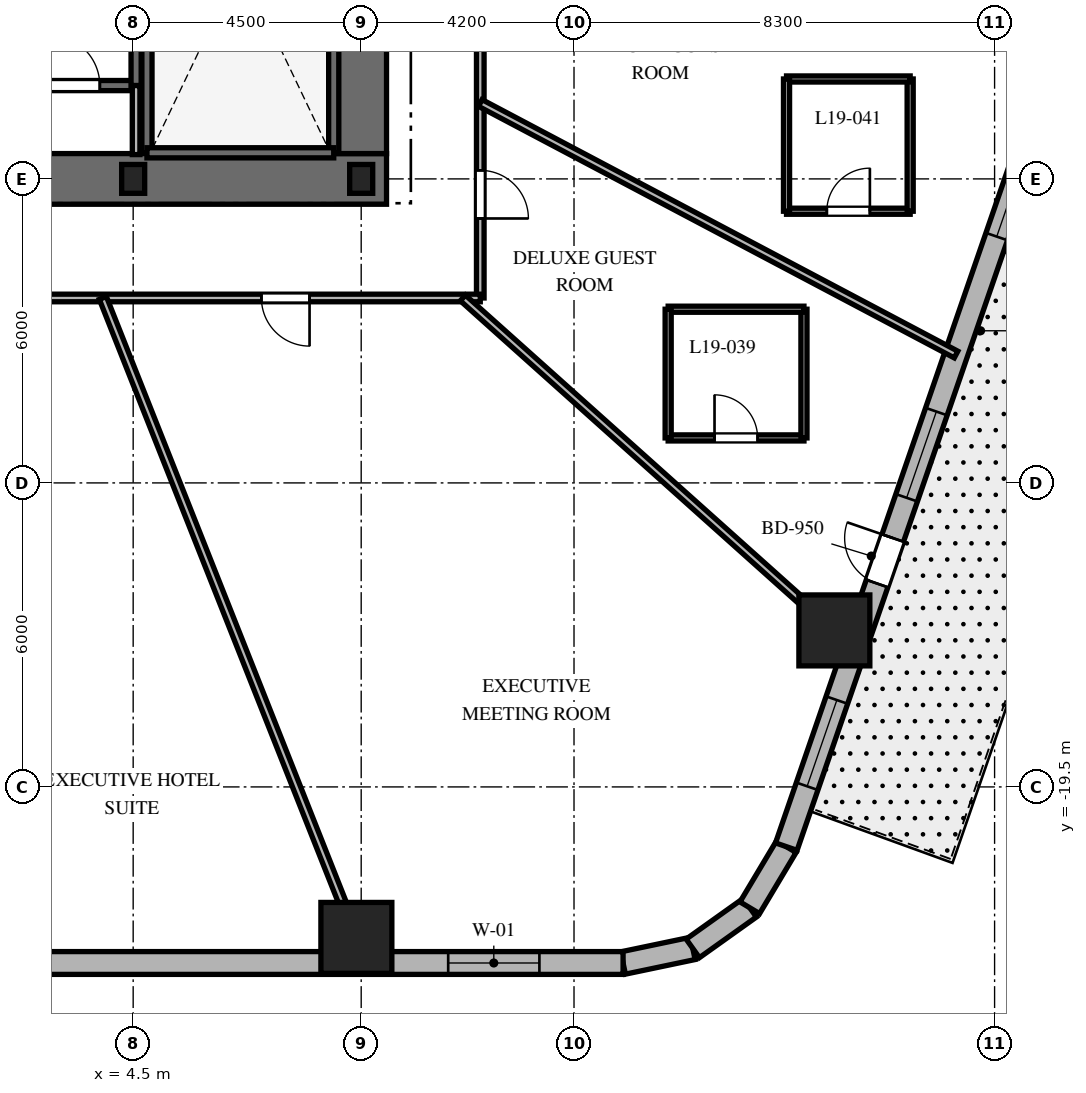
"""IFC4 building model, lengths in metres.
Left out: names, types, materials, properties, quantities, classifications, styles, units other than length and angle.
Written with IfcOpenShell. Run it as: python <this file> out.ifc"""

import sys

from ifc_helpers import new_model, si_unit, direction, frame, frame_2d, origin, origin_2d, place, context, subcontext, project, spatial, rectangle, i_section, extrude, element, fill, save


model = new_model("IFC4")
c1 = context("Model", 3, precision=1e-05, world=origin(), true_north=direction((0.0, 1.0)))
c2 = subcontext(c1, "Body", "Model", "MODEL_VIEW")
j1 = project(units=[si_unit("LENGTHUNIT", "METRE"), si_unit("PLANEANGLEUNIT", "RADIAN")], contexts=[c1])
p1 = place(None, origin())
s1 = spatial("IfcSite", under=j1, at=p1, CompositionType="ELEMENT")
p2 = place(p1, origin())
s2 = spatial("IfcBuilding", under=s1, at=p2, CompositionType="ELEMENT")
p3 = place(p2, frame((0.0, 0.0, 82.3)))
s3 = spatial("IfcBuildingStorey", under=s2, at=p3, CompositionType="ELEMENT", Elevation=82.3)
p4 = place(p3, frame((-9.5, -7.5, 0.0), z_axis=(0.0, 0.0, 1.0), x_axis=(1.0, 0.0, 0.0)))
e1 = element("IfcWall", 1, at=p4, inside=s3, PredefinedType="SHEAR", context=c2, shape_type="SweptSolid", body=[
    extrude(rectangle(XDim=19.0, YDim=1.0, at=frame_2d((9.5, 0.0))), origin(), (0.0, 0.0, 1.0), 3.7),
])
p5 = place(p4, frame((9.55, 0.0, 0.0)))
e2 = element("IfcOpeningElement", 2, at=p5, cuts=e1, PredefinedType="OPENING", context=c2, shape_type="SweptSolid", body=[
    extrude(rectangle(XDim=1.0, YDim=2.15, at=frame_2d((0.5, 1.075))), frame((0.0, 0.51, 0.0), z_axis=(0.0, -1.0, 0.0), x_axis=(1.0, 0.0, 0.0)), (0.0, 0.0, 1.0), 1.02),
])
p6 = place(p3, frame((9.0, -7.0, 0.0), z_axis=(0.0, 0.0, 1.0), x_axis=(0.0, 1.0, 0.0)))
e3 = element("IfcWall", 3, at=p6, inside=s3, PredefinedType="SHEAR", context=c2, shape_type="SweptSolid", body=[
    extrude(rectangle(XDim=14.0, YDim=1.0, at=frame_2d((7.0, 0.0))), origin(), (0.0, 0.0, 1.0), 3.7),
])
p7 = place(p6, frame((10.125, 0.0, 0.0)))
e4 = element("IfcOpeningElement", 4, at=p7, cuts=e3, PredefinedType="OPENING", context=c2, shape_type="SweptSolid", body=[
    extrude(rectangle(XDim=1.05, YDim=2.15, at=frame_2d((0.525, 1.075))), frame((0.0, 0.51, 0.0), z_axis=(0.0, -1.0, 0.0), x_axis=(1.0, 0.0, 0.0)), (0.0, 0.0, 1.0), 1.02),
])
for number, where, z_axis, x_axis in (
    (5, (4.772, -6.985, 0.0), (0.0, 0.0, 1.0), (0.0, 1.0, 0.0)),
    (6, (8.458, -6.985, 0.0), (0.0, 0.0, 1.0), (0.0, 1.0, 0.0)),
):
    element("IfcWall", number, at=place(p3, frame(where, z_axis=z_axis, x_axis=x_axis)), inside=s3, PredefinedType="SHEAR", context=c2, shape_type="SweptSolid", body=[
        extrude(rectangle(XDim=9.143, YDim=0.2, at=frame_2d((4.572, 0.0))), origin(), (0.0, 0.0, 1.0), 3.7),
    ])
p8 = place(p3, frame((4.772, -6.985, 0.0), z_axis=(0.0, 0.0, 1.0), x_axis=(1.0, 0.0, 0.0)))
e7 = element("IfcWall", 7, at=p8, inside=s3, PredefinedType="SHEAR", context=c2, shape_type="SweptSolid", body=[
    extrude(rectangle(XDim=3.686, YDim=0.2, at=frame_2d((1.843, 0.0))), origin(), (0.0, 0.0, 1.0), 3.7),
])
p9 = place(p3, frame((-4.608, -5.658, 0.0), z_axis=(0.0, 0.0, 1.0), x_axis=(1.0, 0.0, 0.0)))
e8 = element("IfcWall", 8, at=p9, inside=s3, PredefinedType="SHEAR", context=c2, shape_type="SweptSolid", body=[
    extrude(rectangle(XDim=9.166, YDim=0.2, at=frame_2d((4.583, 0.0))), origin(), (0.0, 0.0, 1.0), 3.7),
])
p10 = place(p9, frame((7.45, 0.0, 0.0)))
e9 = element("IfcOpeningElement", 9, at=p10, cuts=e8, PredefinedType="OPENING", context=c2, shape_type="SweptSolid", body=[
    extrude(rectangle(XDim=1.0, YDim=2.15, at=frame_2d((0.5, 1.075))), frame((0.0, 0.11, 0.0), z_axis=(0.0, -1.0, 0.0), x_axis=(1.0, 0.0, 0.0)), (0.0, 0.0, 1.0), 0.22),
])
p11 = place(p3, frame((4.558, -5.658, 0.0), z_axis=(0.0, 0.0, 1.0), x_axis=(0.0, 1.0, 0.0)))
e10 = element("IfcWall", 10, at=p11, inside=s3, PredefinedType="SHEAR", context=c2, shape_type="SweptSolid", body=[
    extrude(rectangle(XDim=3.686, YDim=0.2, at=frame_2d((1.843, 0.0))), origin(), (0.0, 0.0, 1.0), 3.7),
])
for number, where, z_axis, x_axis in (
    (11, (4.5, -7.5, 0.0), (0.0, 0.0, 1.0), (1.0, 0.0, 0.0)),
    (12, (9.0, -7.5, 0.0), (0.0, 0.0, 1.0), (1.0, 0.0, 0.0)),
):
    element("IfcColumn", number, at=place(p3, frame(where, z_axis=z_axis, x_axis=x_axis)), inside=s3, PredefinedType="COLUMN", context=c2, shape_type="SweptSolid", body=[
        extrude(i_section(OverallWidth=0.454, OverallDepth=0.569, WebThickness=0.078, FlangeThickness=0.125, at=origin_2d()), origin(), (0.0, 0.0, 1.0), 3.7),
    ])
for number, where, z_axis, x_axis in (
    (13, (8.905, -22.48, 0.0), (0.0, 0.0, 1.0), (1.0, 0.0, 0.0)),
    (14, (18.338, -16.411, 0.0), (0.0, 0.0, 1.0), (1.0, 0.0, 0.0)),
):
    element("IfcColumn", number, at=place(p3, frame(where, z_axis=z_axis, x_axis=x_axis)), inside=s3, PredefinedType="COLUMN", context=c2, shape_type="SweptSolid", body=[
        extrude(rectangle(XDim=1.4, YDim=1.4, at=origin_2d()), origin(), (0.0, 0.0, 1.0), 3.7),
    ])
p12 = place(p3, frame((14.168, -22.975, 0.0), z_axis=(0.0, 0.0, 1.0), x_axis=(0.978770371074, 0.204959900243, 0.0)))
e15 = element("IfcWall", 15, at=p12, inside=s3, PredefinedType="SOLIDWALL", context=c2, shape_type="SweptSolid", body=[
    extrude(rectangle(XDim=1.406, YDim=0.45, at=frame_2d((0.703, 0.0))), origin(), (0.0, 0.0, 1.0), 3.38),
])
p13 = place(p3, frame((15.544, -22.687, 0.0), z_axis=(0.0, 0.0, 1.0), x_axis=(0.814210854316, 0.580569276412, 0.0)))
e16 = element("IfcWall", 16, at=p13, inside=s3, PredefinedType="SOLIDWALL", context=c2, shape_type="SweptSolid", body=[
    extrude(rectangle(XDim=1.381, YDim=0.45, at=frame_2d((0.691, 0.0))), origin(), (0.0, 0.0, 1.0), 3.38),
])
p14 = place(p3, frame((16.669, -21.885, 0.0), z_axis=(0.0, 0.0, 1.0), x_axis=(0.512936712947, 0.858426425799, 0.0)))
e17 = element("IfcWall", 17, at=p14, inside=s3, PredefinedType="SOLIDWALL", context=c2, shape_type="SweptSolid", body=[
    extrude(rectangle(XDim=1.406, YDim=0.45, at=frame_2d((0.703, 0.0))), origin(), (0.0, 0.0, 1.0), 3.38),
])
p15 = place(p3, frame((-12.221, -22.975, 0.0), z_axis=(0.0, 0.0, 1.0), x_axis=(1.0, 0.0, 0.0)))
e18 = element("IfcWall", 18, at=p15, inside=s3, PredefinedType="SOLIDWALL", context=c2, shape_type="SweptSolid", body=[
    extrude(rectangle(XDim=26.389, YDim=0.45, at=frame_2d((13.195, 0.0))), origin(), (0.0, 0.0, 1.0), 3.38),
])
p16 = place(p15, frame((1.653, 0.0, 0.8)))
e19 = element("IfcOpeningElement", 19, at=p16, cuts=e18, PredefinedType="OPENING", context=c2, shape_type="SweptSolid", body=[
    extrude(rectangle(XDim=1.8, YDim=1.8, at=frame_2d((0.9, 0.9))), frame((0.0, 0.235, 0.0), z_axis=(0.0, -1.0, 0.0), x_axis=(1.0, 0.0, 0.0)), (0.0, 0.0, 1.0), 0.47),
])
p17 = place(p15, frame((12.296, 0.0, 0.8)))
e20 = element("IfcOpeningElement", 20, at=p17, cuts=e18, PredefinedType="OPENING", context=c2, shape_type="SweptSolid", body=[
    extrude(rectangle(XDim=1.8, YDim=1.8, at=frame_2d((0.9, 0.9))), frame((0.0, 0.235, 0.0), z_axis=(0.0, -1.0, 0.0), x_axis=(1.0, 0.0, 0.0)), (0.0, 0.0, 1.0), 0.47),
])
p18 = place(p15, frame((22.938, 0.0, 0.8)))
e21 = element("IfcOpeningElement", 21, at=p18, cuts=e18, PredefinedType="OPENING", context=c2, shape_type="SweptSolid", body=[
    extrude(rectangle(XDim=1.8, YDim=1.8, at=frame_2d((0.9, 0.9))), frame((0.0, 0.235, 0.0), z_axis=(0.0, -1.0, 0.0), x_axis=(1.0, 0.0, 0.0)), (0.0, 0.0, 1.0), 0.47),
])
p19 = place(p3, frame((17.39, -20.678, 0.0), z_axis=(0.0, 0.0, 1.0), x_axis=(0.326068018294, 0.945346310854, 0.0)))
e22 = element("IfcWall", 22, at=p19, inside=s3, PredefinedType="SOLIDWALL", context=c2, shape_type="SweptSolid", body=[
    extrude(rectangle(XDim=21.793, YDim=0.45, at=frame_2d((10.896, 0.0))), origin(), (0.0, 0.0, 1.0), 3.38),
])
p20 = place(p19, frame((5.493, 0.0, 0.0)))
e23 = element("IfcOpeningElement", 23, at=p20, cuts=e22, PredefinedType="OPENING", context=c2, shape_type="SweptSolid", body=[
    extrude(rectangle(XDim=0.95, YDim=2.15, at=frame_2d((0.475, 1.075))), frame((0.0, 0.235, 0.0), z_axis=(0.0, -1.0, 0.0), x_axis=(1.0, 0.0, 0.0)), (0.0, 0.0, 1.0), 0.47),
])
p21 = place(p19, frame((1.26, 0.0, 0.8)))
e24 = element("IfcOpeningElement", 24, at=p21, cuts=e22, PredefinedType="OPENING", context=c2, shape_type="SweptSolid", body=[
    extrude(rectangle(XDim=1.8, YDim=1.8, at=frame_2d((0.9, 0.9))), frame((0.0, 0.235, 0.0), z_axis=(0.0, -1.0, 0.0), x_axis=(1.0, 0.0, 0.0)), (0.0, 0.0, 1.0), 0.47),
])
p22 = place(p19, frame((7.283, 0.0, 0.8)))
e25 = element("IfcOpeningElement", 25, at=p22, cuts=e22, PredefinedType="OPENING", context=c2, shape_type="SweptSolid", body=[
    extrude(rectangle(XDim=1.8, YDim=1.8, at=frame_2d((0.9, 0.9))), frame((0.0, 0.235, 0.0), z_axis=(0.0, -1.0, 0.0), x_axis=(1.0, 0.0, 0.0)), (0.0, 0.0, 1.0), 0.47),
])
p23 = place(p19, frame((12.736, 0.0, 0.8)))
e26 = element("IfcOpeningElement", 26, at=p23, cuts=e22, PredefinedType="OPENING", context=c2, shape_type="SweptSolid", body=[
    extrude(rectangle(XDim=1.8, YDim=1.8, at=frame_2d((0.9, 0.9))), frame((0.0, 0.235, 0.0), z_axis=(0.0, -1.0, 0.0), x_axis=(1.0, 0.0, 0.0)), (0.0, 0.0, 1.0), 0.47),
])
p24 = place(p19, frame((18.68, 0.0, 0.8)))
e27 = element("IfcOpeningElement", 27, at=p24, cuts=e22, PredefinedType="OPENING", context=c2, shape_type="SweptSolid", body=[
    extrude(rectangle(XDim=1.8, YDim=1.8, at=frame_2d((0.9, 0.9))), frame((0.0, 0.235, 0.0), z_axis=(0.0, -1.0, 0.0), x_axis=(1.0, 0.0, 0.0)), (0.0, 0.0, 1.0), 0.47),
])
p25 = place(p3, frame((4.558, -7.02, 0.0), z_axis=(0.0, 0.0, 1.0), x_axis=(0.0, 1.0, 0.0)))
e28 = element("IfcWall", 28, at=p25, inside=s3, PredefinedType="PARTITIONING", context=c2, shape_type="SweptSolid", body=[
    extrude(rectangle(XDim=1.362, YDim=0.15, at=frame_2d((0.681, 0.0))), origin(), (0.0, 0.0, 1.0), 3.38),
])
p26 = place(p3, frame((11.35, 9.85, 0.0), z_axis=(0.0, 0.0, 1.0), x_axis=(0.0, -1.0, 0.0)))
e29 = element("IfcWall", 29, at=p26, inside=s3, PredefinedType="PARTITIONING", context=c2, shape_type="SweptSolid", body=[
    extrude(rectangle(XDim=19.7, YDim=0.15, at=frame_2d((9.85, 0.0))), origin(), (0.0, 0.0, 1.0), 2.82),
])
p27 = place(p26, frame((4.208, 0.0, 0.0)))
e30 = element("IfcOpeningElement", 30, at=p27, cuts=e29, PredefinedType="OPENING", context=c2, shape_type="SweptSolid", body=[
    extrude(rectangle(XDim=0.95, YDim=2.03, at=frame_2d((0.475, 1.015))), frame((0.0, 0.085, 0.0), z_axis=(0.0, -1.0, 0.0), x_axis=(1.0, 0.0, 0.0)), (0.0, 0.0, 1.0), 0.17),
])
p28 = place(p26, frame((0.97, 0.0, 0.0)))
e31 = element("IfcOpeningElement", 31, at=p28, cuts=e29, PredefinedType="OPENING", context=c2, shape_type="SweptSolid", body=[
    extrude(rectangle(XDim=0.95, YDim=2.03, at=frame_2d((0.475, 1.015))), frame((0.0, 0.085, 0.0), z_axis=(0.0, -1.0, 0.0), x_axis=(1.0, 0.0, 0.0)), (0.0, 0.0, 1.0), 0.17),
])
p29 = place(p26, frame((17.181, 0.0, 0.0)))
e32 = element("IfcOpeningElement", 32, at=p29, cuts=e29, PredefinedType="OPENING", context=c2, shape_type="SweptSolid", body=[
    extrude(rectangle(XDim=0.95, YDim=2.03, at=frame_2d((0.475, 1.015))), frame((0.0, 0.085, 0.0), z_axis=(0.0, -1.0, 0.0), x_axis=(1.0, 0.0, 0.0)), (0.0, 0.0, 1.0), 0.17),
])
p30 = place(p26, frame((13.403, 0.0, 0.0)))
e33 = element("IfcOpeningElement", 33, at=p30, cuts=e29, PredefinedType="OPENING", context=c2, shape_type="SweptSolid", body=[
    extrude(rectangle(XDim=0.95, YDim=2.03, at=frame_2d((0.475, 1.015))), frame((0.0, 0.085, 0.0), z_axis=(0.0, -1.0, 0.0), x_axis=(1.0, 0.0, 0.0)), (0.0, 0.0, 1.0), 0.17),
])
p31 = place(p26, frame((8.838, 0.0, 0.0)))
e34 = element("IfcOpeningElement", 34, at=p31, cuts=e29, PredefinedType="OPENING", context=c2, shape_type="SweptSolid", body=[
    extrude(rectangle(XDim=0.95, YDim=2.03, at=frame_2d((0.475, 1.015))), frame((0.0, 0.085, 0.0), z_axis=(0.0, -1.0, 0.0), x_axis=(1.0, 0.0, 0.0)), (0.0, 0.0, 1.0), 0.17),
])
p32 = place(p3, frame((11.35, -9.85, 0.0), z_axis=(0.0, 0.0, 1.0), x_axis=(-1.0, 0.0, 0.0)))
e35 = element("IfcWall", 35, at=p32, inside=s3, PredefinedType="PARTITIONING", context=c2, shape_type="SweptSolid", body=[
    extrude(rectangle(XDim=22.7, YDim=0.15, at=frame_2d((11.35, 0.0))), origin(), (0.0, 0.0, 1.0), 2.82),
])
p33 = place(p32, frame((18.837, 0.0, 0.0)))
e36 = element("IfcOpeningElement", 36, at=p33, cuts=e35, PredefinedType="OPENING", context=c2, shape_type="SweptSolid", body=[
    extrude(rectangle(XDim=0.9, YDim=2.03, at=frame_2d((0.45, 1.015))), frame((0.0, 0.085, 0.0), z_axis=(0.0, -1.0, 0.0), x_axis=(1.0, 0.0, 0.0)), (0.0, 0.0, 1.0), 0.17),
])
p34 = place(p32, frame((15.532, 0.0, 0.0)))
e37 = element("IfcOpeningElement", 37, at=p34, cuts=e35, PredefinedType="OPENING", context=c2, shape_type="SweptSolid", body=[
    extrude(rectangle(XDim=0.95, YDim=2.03, at=frame_2d((0.475, 1.015))), frame((0.0, 0.085, 0.0), z_axis=(0.0, -1.0, 0.0), x_axis=(1.0, 0.0, 0.0)), (0.0, 0.0, 1.0), 0.17),
])
p35 = place(p32, frame((10.444, 0.0, 0.0)))
e38 = element("IfcOpeningElement", 38, at=p35, cuts=e35, PredefinedType="OPENING", context=c2, shape_type="SweptSolid", body=[
    extrude(rectangle(XDim=0.95, YDim=2.03, at=frame_2d((0.475, 1.015))), frame((0.0, 0.085, 0.0), z_axis=(0.0, -1.0, 0.0), x_axis=(1.0, 0.0, 0.0)), (0.0, 0.0, 1.0), 0.17),
])
p36 = place(p32, frame((3.369, 0.0, 0.0)))
e39 = element("IfcOpeningElement", 39, at=p36, cuts=e35, PredefinedType="OPENING", context=c2, shape_type="SweptSolid", body=[
    extrude(rectangle(XDim=0.95, YDim=2.03, at=frame_2d((0.475, 1.015))), frame((0.0, 0.085, 0.0), z_axis=(0.0, -1.0, 0.0), x_axis=(1.0, 0.0, 0.0)), (0.0, 0.0, 1.0), 0.17),
])
p37 = place(p3, frame((3.902, -9.85, 0.0), z_axis=(0.0, 0.0, 1.0), x_axis=(0.36828765711, -0.929711891728, 0.0)))
e40 = element("IfcWall", 40, at=p37, inside=s3, PredefinedType="PARTITIONING", context=c2, shape_type="SweptSolid", body=[
    extrude(rectangle(XDim=14.117, YDim=0.15, at=frame_2d((7.059, 0.0))), origin(), (0.0, 0.0, 1.0), 2.52),
])
p38 = place(p3, frame((11.007, -9.85, 0.0), z_axis=(0.0, 0.0, 1.0), x_axis=(0.745177305978, -0.666866390407, 0.0)))
e41 = element("IfcWall", 41, at=p38, inside=s3, PredefinedType="PARTITIONING", context=c2, shape_type="SweptSolid", body=[
    extrude(rectangle(XDim=10.375, YDim=0.15, at=frame_2d((5.188, 0.0))), origin(), (0.0, 0.0, 1.0), 2.52),
])
p39 = place(p3, frame((11.35, -6.001, 0.0), z_axis=(0.0, 0.0, 1.0), x_axis=(0.884022077319, -0.467445148453, 0.0)))
e42 = element("IfcWall", 42, at=p39, inside=s3, PredefinedType="PARTITIONING", context=c2, shape_type="SweptSolid", body=[
    extrude(rectangle(XDim=10.621, YDim=0.15, at=frame_2d((5.311, 0.0))), origin(), (0.0, 0.0, 1.0), 2.52),
])
p40 = place(p3, frame((15.058, -12.612, 0.0), z_axis=(0.0, 0.0, 1.0), x_axis=(1.0, 0.0, 0.0)))
e43 = element("IfcWall", 43, at=p40, inside=s3, PredefinedType="PARTITIONING", context=c2, shape_type="SweptSolid", body=[
    extrude(rectangle(XDim=2.68, YDim=0.12, at=frame_2d((1.34, 0.0))), origin(), (0.0, 0.0, 1.0), 2.952),
])
p41 = place(p40, frame((0.915, 0.0, 0.0)))
e44 = element("IfcOpeningElement", 44, at=p41, cuts=e43, PredefinedType="OPENING", context=c2, shape_type="SweptSolid", body=[
    extrude(rectangle(XDim=0.85, YDim=2.03, at=frame_2d((0.425, 1.015))), frame((0.0, 0.07, 0.0), z_axis=(0.0, -1.0, 0.0), x_axis=(1.0, 0.0, 0.0)), (0.0, 0.0, 1.0), 0.14),
])
p42 = place(p3, frame((17.738, -12.612, 0.0), z_axis=(0.0, 0.0, 1.0), x_axis=(0.0, 1.0, 0.0)))
e45 = element("IfcWall", 45, at=p42, inside=s3, PredefinedType="PARTITIONING", context=c2, shape_type="SweptSolid", body=[
    extrude(rectangle(XDim=2.54, YDim=0.12, at=frame_2d((1.27, 0.0))), origin(), (0.0, 0.0, 1.0), 3.38),
])
p43 = place(p3, frame((17.738, -10.072, 0.0), z_axis=(0.0, 0.0, 1.0), x_axis=(-1.0, 0.0, 0.0)))
e46 = element("IfcWall", 46, at=p43, inside=s3, PredefinedType="PARTITIONING", context=c2, shape_type="SweptSolid", body=[
    extrude(rectangle(XDim=2.68, YDim=0.12, at=frame_2d((1.34, 0.0))), origin(), (0.0, 0.0, 1.0), 2.952),
])
p44 = place(p3, frame((15.058, -10.072, 0.0), z_axis=(0.0, 0.0, 1.0), x_axis=(0.0, -1.0, 0.0)))
e47 = element("IfcWall", 47, at=p44, inside=s3, PredefinedType="PARTITIONING", context=c2, shape_type="SweptSolid", body=[
    extrude(rectangle(XDim=2.54, YDim=0.12, at=frame_2d((1.27, 0.0))), origin(), (0.0, 0.0, 1.0), 3.38),
])
p45 = place(p3, frame((17.394, -8.138, 0.0), z_axis=(0.0, 0.0, 1.0), x_axis=(1.0, 0.0, 0.0)))
e48 = element("IfcWall", 48, at=p45, inside=s3, PredefinedType="PARTITIONING", context=c2, shape_type="SweptSolid", body=[
    extrude(rectangle(XDim=2.44, YDim=0.12, at=frame_2d((1.22, 0.0))), origin(), (0.0, 0.0, 1.0), 3.38),
])
p46 = place(p45, frame((0.795, 0.0, 0.0)))
e49 = element("IfcOpeningElement", 49, at=p46, cuts=e48, PredefinedType="OPENING", context=c2, shape_type="SweptSolid", body=[
    extrude(rectangle(XDim=0.85, YDim=2.03, at=frame_2d((0.425, 1.015))), frame((0.0, 0.07, 0.0), z_axis=(0.0, -1.0, 0.0), x_axis=(1.0, 0.0, 0.0)), (0.0, 0.0, 1.0), 0.14),
])
p47 = place(p3, frame((19.834, -8.138, 0.0), z_axis=(0.0, 0.0, 1.0), x_axis=(0.0, 1.0, 0.0)))
e50 = element("IfcWall", 50, at=p47, inside=s3, PredefinedType="PARTITIONING", context=c2, shape_type="SweptSolid", body=[
    extrude(rectangle(XDim=2.61, YDim=0.12, at=frame_2d((1.305, 0.0))), origin(), (0.0, 0.0, 1.0), 3.38),
])
p48 = place(p3, frame((19.834, -5.528, 0.0), z_axis=(0.0, 0.0, 1.0), x_axis=(-1.0, 0.0, 0.0)))
e51 = element("IfcWall", 51, at=p48, inside=s3, PredefinedType="PARTITIONING", context=c2, shape_type="SweptSolid", body=[
    extrude(rectangle(XDim=2.44, YDim=0.12, at=frame_2d((1.22, 0.0))), origin(), (0.0, 0.0, 1.0), 2.82),
])
p49 = place(p3, frame((17.394, -5.528, 0.0), z_axis=(0.0, 0.0, 1.0), x_axis=(0.0, -1.0, 0.0)))
e52 = element("IfcWall", 52, at=p49, inside=s3, PredefinedType="PARTITIONING", context=c2, shape_type="SweptSolid", body=[
    extrude(rectangle(XDim=2.61, YDim=0.12, at=frame_2d((1.305, 0.0))), origin(), (0.0, 0.0, 1.0), 2.952),
])
p50 = place(p18, origin())
e53 = element("IfcWindow", 53, at=p50, inside=s3, PartitioningType="SINGLE_PANEL", PredefinedType="WINDOW", context=c2, shape_type="SweptSolid", body=[
    extrude(rectangle(XDim=1.8, YDim=1.8, at=frame_2d((0.9, 0.9))), frame((0.0, 0.03, 0.0), z_axis=(0.0, -1.0, 0.0), x_axis=(1.0, 0.0, 0.0)), (0.0, 0.0, 1.0), 0.06),
])
fill(e21, e53)
p51 = place(p20, origin())
e54 = element("IfcDoor", 54, at=p51, inside=s3, OperationType="SINGLE_SWING_RIGHT", PredefinedType="DOOR", context=c2, shape_type="SweptSolid", body=[
    extrude(rectangle(XDim=0.95, YDim=2.15, at=frame_2d((0.475, 1.075))), frame((0.0, 0.025, 0.0), z_axis=(0.0, -1.0, 0.0), x_axis=(1.0, 0.0, 0.0)), (0.0, 0.0, 1.0), 0.05),
])
fill(e23, e54)
p52 = place(p21, origin())
e55 = element("IfcWindow", 55, at=p52, inside=s3, PartitioningType="SINGLE_PANEL", PredefinedType="WINDOW", context=c2, shape_type="SweptSolid", body=[
    extrude(rectangle(XDim=1.8, YDim=1.8, at=frame_2d((0.9, 0.9))), frame((0.0, 0.03, 0.0), z_axis=(0.0, -1.0, 0.0), x_axis=(1.0, 0.0, 0.0)), (0.0, 0.0, 1.0), 0.06),
])
fill(e24, e55)
p53 = place(p22, origin())
e56 = element("IfcWindow", 56, at=p53, inside=s3, PartitioningType="SINGLE_PANEL", PredefinedType="WINDOW", context=c2, shape_type="SweptSolid", body=[
    extrude(rectangle(XDim=1.8, YDim=1.8, at=frame_2d((0.9, 0.9))), frame((0.0, 0.03, 0.0), z_axis=(0.0, -1.0, 0.0), x_axis=(1.0, 0.0, 0.0)), (0.0, 0.0, 1.0), 0.06),
])
fill(e25, e56)
p54 = place(p23, origin())
e57 = element("IfcWindow", 57, at=p54, inside=s3, PartitioningType="SINGLE_PANEL", PredefinedType="WINDOW", context=c2, shape_type="SweptSolid", body=[
    extrude(rectangle(XDim=1.8, YDim=1.8, at=frame_2d((0.9, 0.9))), frame((0.0, 0.03, 0.0), z_axis=(0.0, -1.0, 0.0), x_axis=(1.0, 0.0, 0.0)), (0.0, 0.0, 1.0), 0.06),
])
fill(e26, e57)
p55 = place(p10, origin())
e58 = element("IfcDoor", 58, at=p55, inside=s3, OperationType="SINGLE_SWING_LEFT", PredefinedType="DOOR", context=c2, shape_type="SweptSolid", body=[
    extrude(rectangle(XDim=1.0, YDim=2.15, at=frame_2d((0.5, 1.075))), frame((0.0, 0.025, 0.0), z_axis=(0.0, -1.0, 0.0), x_axis=(1.0, 0.0, 0.0)), (0.0, 0.0, 1.0), 0.05),
])
fill(e9, e58)
p56 = place(p36, origin())
e59 = element("IfcDoor", 59, at=p56, inside=s3, OperationType="SINGLE_SWING_LEFT", PredefinedType="DOOR", context=c2, shape_type="SweptSolid", body=[
    extrude(rectangle(XDim=0.95, YDim=2.03, at=frame_2d((0.475, 1.015))), frame((0.0, 0.025, 0.0), z_axis=(0.0, -1.0, 0.0), x_axis=(1.0, 0.0, 0.0)), (0.0, 0.0, 1.0), 0.05),
])
fill(e39, e59)
p57 = place(p29, origin())
e60 = element("IfcDoor", 60, at=p57, inside=s3, OperationType="SINGLE_SWING_RIGHT", PredefinedType="DOOR", context=c2, shape_type="SweptSolid", body=[
    extrude(rectangle(XDim=0.95, YDim=2.03, at=frame_2d((0.475, 1.015))), frame((0.0, 0.025, 0.0), z_axis=(0.0, -1.0, 0.0), x_axis=(1.0, 0.0, 0.0)), (0.0, 0.0, 1.0), 0.05),
])
fill(e32, e60)
p58 = place(p41, origin())
e61 = element("IfcDoor", 61, at=p58, inside=s3, OperationType="SINGLE_SWING_LEFT", PredefinedType="DOOR", context=c2, shape_type="SweptSolid", body=[
    extrude(rectangle(XDim=0.85, YDim=2.03, at=frame_2d((0.425, 1.015))), frame((0.0, 0.025, 0.0), z_axis=(0.0, -1.0, 0.0), x_axis=(1.0, 0.0, 0.0)), (0.0, 0.0, 1.0), 0.05),
])
fill(e44, e61)
p59 = place(p46, origin())
e62 = element("IfcDoor", 62, at=p59, inside=s3, OperationType="SINGLE_SWING_RIGHT", PredefinedType="DOOR", context=c2, shape_type="SweptSolid", body=[
    extrude(rectangle(XDim=0.85, YDim=2.03, at=frame_2d((0.425, 1.015))), frame((0.0, 0.025, 0.0), z_axis=(0.0, -1.0, 0.0), x_axis=(1.0, 0.0, 0.0)), (0.0, 0.0, 1.0), 0.05),
])
fill(e49, e62)
save(model, sys.argv[1])
